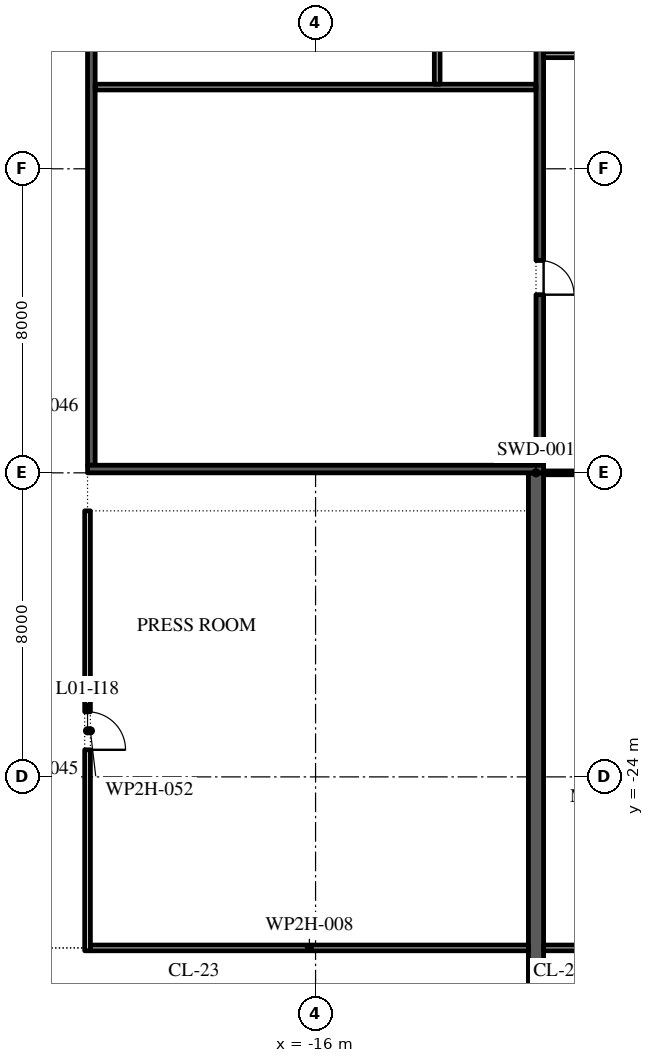
"""IFC4 building model, lengths in metres.
Left out: names, types, materials, properties, quantities, classifications, styles, units other than length and angle.
Written with IfcOpenShell. Run it as: python <this file> out.ifc"""

import sys

from ifc_helpers import new_model, si_unit, direction, frame, frame_2d, origin, place, context, subcontext, project, spatial, rectangle, extrude, element, fill, save


model = new_model("IFC4")
c1 = context("Model", 3, precision=1e-05, world=origin(), true_north=direction((0.0, 1.0)))
c2 = subcontext(c1, "Body", "Model", "MODEL_VIEW")
j1 = project(units=[si_unit("LENGTHUNIT", "METRE"), si_unit("PLANEANGLEUNIT", "RADIAN")], contexts=[c1])
p1 = place(None, origin())
s1 = spatial("IfcSite", under=j1, at=p1, CompositionType="ELEMENT")
p2 = place(p1, origin())
s2 = spatial("IfcBuilding", under=s1, at=p2, CompositionType="ELEMENT")
p3 = place(p2, frame((0.0, 0.0, 8.0)))
s3 = spatial("IfcBuildingStorey", under=s2, at=p3, CompositionType="ELEMENT", Elevation=8.0)
p4 = place(p3, frame((-10.2, -31.0, 0.0), z_axis=(0.0, 0.0, 1.0), x_axis=(0.0, 1.0, 0.0)))
e1 = element("IfcWall", 1, at=p4, inside=s3, PredefinedType="SHEAR", context=c2, shape_type="SweptSolid", body=[
    extrude(rectangle(XDim=15.0, YDim=0.4, at=frame_2d((7.5, 0.0))), origin(), (0.0, 0.0, 1.0), 5.7),
])
p5 = place(p3, frame((-21.9, -15.8, 0.0), z_axis=(0.0, 0.0, 1.0), x_axis=(0.0, 1.0, 0.0)))
e2 = element("IfcWall", 2, at=p5, inside=s3, PredefinedType="SHEAR", context=c2, shape_type="SweptSolid", body=[
    extrude(rectangle(XDim=13.05, YDim=0.2, at=frame_2d((6.525, 0.0))), origin(), (0.0, 0.0, 1.0), 5.7),
])
p6 = place(p5, frame((11.087, 0.0, 0.0)))
e3 = element("IfcOpeningElement", 3, at=p6, cuts=e2, PredefinedType="OPENING", context=c2, shape_type="SweptSolid", body=[
    extrude(rectangle(XDim=0.9, YDim=2.1, at=frame_2d((0.45, 1.05))), frame((0.0, 0.11, 0.0), z_axis=(0.0, -1.0, 0.0), x_axis=(1.0, 0.0, 0.0)), (0.0, 0.0, 1.0), 0.22),
])
p7 = place(p3, frame((-10.1, -15.8, 0.0), z_axis=(0.0, 0.0, 1.0), x_axis=(0.0, 1.0, 0.0)))
e4 = element("IfcWall", 4, at=p7, inside=s3, PredefinedType="SHEAR", context=c2, shape_type="SweptSolid", body=[
    extrude(rectangle(XDim=13.05, YDim=0.2, at=frame_2d((6.525, 0.0))), origin(), (0.0, 0.0, 1.0), 5.7),
])
p8 = place(p7, frame((4.488, 0.0, 0.0)))
e5 = element("IfcOpeningElement", 5, at=p8, cuts=e4, PredefinedType="OPENING", context=c2, shape_type="SweptSolid", body=[
    extrude(rectangle(XDim=0.9, YDim=2.1, at=frame_2d((0.45, 1.05))), frame((0.0, 0.11, 0.0), z_axis=(0.0, -1.0, 0.0), x_axis=(1.0, 0.0, 0.0)), (0.0, 0.0, 1.0), 0.22),
])
p9 = place(p7, frame((11.038, 0.0, 0.0)))
e6 = element("IfcOpeningElement", 6, at=p9, cuts=e4, PredefinedType="OPENING", context=c2, shape_type="SweptSolid", body=[
    extrude(rectangle(XDim=1.0, YDim=2.1, at=frame_2d((0.5, 1.05))), frame((0.0, 0.11, 0.0), z_axis=(0.0, -1.0, 0.0), x_axis=(1.0, 0.0, 0.0)), (0.0, 0.0, 1.0), 0.22),
])
p10 = place(p3, frame((-22.0, -15.9, 0.0), z_axis=(0.0, 0.0, 1.0), x_axis=(1.0, 0.0, 0.0)))
e7 = element("IfcWall", 7, at=p10, inside=s3, PredefinedType="SHEAR", context=c2, shape_type="SweptSolid", body=[
    extrude(rectangle(XDim=12.0, YDim=0.2, at=frame_2d((6.0, 0.0))), origin(), (0.0, 0.0, 1.0), 5.7),
])
p11 = place(p3, frame((-21.8, -5.85, 0.0), z_axis=(0.0, 0.0, 1.0), x_axis=(1.0, 0.0, 0.0)))
e8 = element("IfcWall", 8, at=p11, inside=s3, PredefinedType="PARTITIONING", context=c2, shape_type="SweptSolid", body=[
    extrude(rectangle(XDim=11.6, YDim=0.15, at=frame_2d((5.8, 0.0))), origin(), (0.0, 0.0, 1.0), 5.7),
])
p12 = place(p3, frame((-12.8, -5.775, 0.0), z_axis=(0.0, 0.0, 1.0), x_axis=(0.0, 1.0, 0.0)))
e9 = element("IfcWall", 9, at=p12, inside=s3, PredefinedType="PARTITIONING", context=c2, shape_type="SweptSolid", body=[
    extrude(rectangle(XDim=3.025, YDim=0.15, at=frame_2d((1.512, 0.0))), origin(), (0.0, 0.0, 1.0), 5.7),
])
p13 = place(p3, frame((-21.925, -28.5, 0.0), z_axis=(0.0, 0.0, 1.0), x_axis=(1.0, 0.0, 0.0)))
e10 = element("IfcWall", 10, at=p13, inside=s3, PredefinedType="PARTITIONING", context=c2, shape_type="SweptSolid", body=[
    extrude(rectangle(XDim=11.525, YDim=0.15, at=frame_2d((5.763, 0.0))), origin(), (0.0, 0.0, 1.0), 5.7),
])
p14 = place(p3, frame((-10.0, -28.5, 0.0), z_axis=(0.0, 0.0, 1.0), x_axis=(1.0, 0.0, 0.0)))
e11 = element("IfcWall", 11, at=p14, inside=s3, PredefinedType="PARTITIONING", context=c2, shape_type="SweptSolid", body=[
    extrude(rectangle(XDim=7.925, YDim=0.15, at=frame_2d((3.962, 0.0))), origin(), (0.0, 0.0, 1.0), 5.7),
])
p15 = place(p3, frame((-10.0, -16.0, 0.0), z_axis=(0.0, 0.0, 1.0), x_axis=(1.0, 0.0, 0.0)))
e12 = element("IfcWall", 12, at=p15, inside=s3, PredefinedType="PARTITIONING", context=c2, shape_type="SweptSolid", body=[
    extrude(rectangle(XDim=7.925, YDim=0.1, at=frame_2d((3.962, 0.0))), origin(), (0.0, 0.0, 1.0), 5.7),
])
p16 = place(p3, frame((-10.0, -5.0, 0.0), z_axis=(0.0, 0.0, 1.0), x_axis=(1.0, 0.0, 0.0)))
e13 = element("IfcWall", 13, at=p16, inside=s3, PredefinedType="PARTITIONING", context=c2, shape_type="SweptSolid", body=[
    extrude(rectangle(XDim=7.925, YDim=0.15, at=frame_2d((3.962, 0.0))), origin(), (0.0, 0.0, 1.0), 5.7),
])
p17 = place(p3, frame((-22.0, -28.575, 0.0), z_axis=(0.0, 0.0, 1.0), x_axis=(0.0, 1.0, 0.0)))
e14 = element("IfcWall", 14, at=p17, inside=s3, PredefinedType="PARTITIONING", context=c2, shape_type="SweptSolid", body=[
    extrude(rectangle(XDim=11.575, YDim=0.15, at=frame_2d((5.788, 0.0))), origin(), (0.0, 0.0, 1.0), 5.7),
])
p18 = place(p17, frame((5.288, 0.0, 0.0)))
e15 = element("IfcOpeningElement", 15, at=p18, cuts=e14, PredefinedType="OPENING", context=c2, shape_type="SweptSolid", body=[
    extrude(rectangle(XDim=1.0, YDim=2.1, at=frame_2d((0.5, 1.05))), frame((0.0, 0.085, 0.0), z_axis=(0.0, -1.0, 0.0), x_axis=(1.0, 0.0, 0.0)), (0.0, 0.0, 1.0), 0.17),
])
p19 = place(p8, frame((0.9, 0.15, 0.0), z_axis=(0.0, 0.0, 1.0), x_axis=(-1.0, 0.0, 0.0)))
e16 = element("IfcDoor", 16, at=p19, inside=s3, OperationType="SINGLE_SWING_LEFT", PredefinedType="DOOR", context=c2, shape_type="SweptSolid", body=[
    extrude(rectangle(XDim=0.9, YDim=2.1, at=frame_2d((0.45, 1.05))), frame((0.0, 0.1, 0.0), z_axis=(0.0, -1.0, 0.0), x_axis=(1.0, 0.0, 0.0)), (0.0, 0.0, 1.0), 0.05),
])
fill(e5, e16)
p20 = place(p18, frame((1.0, 0.0, 0.0), z_axis=(0.0, 0.0, 1.0), x_axis=(-1.0, 0.0, 0.0)))
e17 = element("IfcDoor", 17, at=p20, inside=s3, OperationType="SINGLE_SWING_LEFT", PredefinedType="DOOR", context=c2, shape_type="SweptSolid", body=[
    extrude(rectangle(XDim=1.0, YDim=2.1, at=frame_2d((0.5, 1.05))), frame((0.0, 0.025, 0.0), z_axis=(0.0, -1.0, 0.0), x_axis=(1.0, 0.0, 0.0)), (0.0, 0.0, 1.0), 0.05),
])
fill(e15, e17)
save(model, sys.argv[1])
